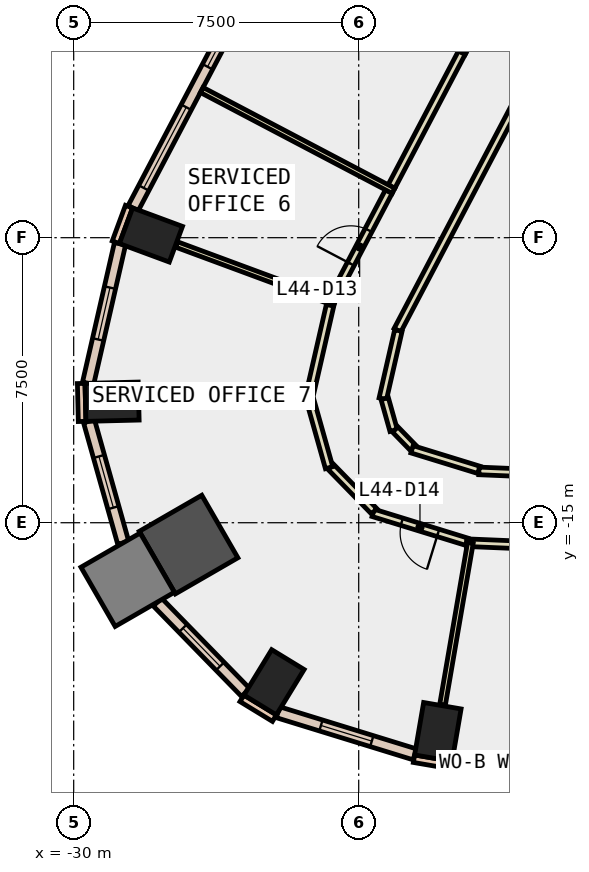
"""IFC4 building model, lengths in metres.
Left out: names, types, materials, properties, quantities, classifications, styles, units other than length and angle.
Written with IfcOpenShell. Run it as: python <this file> out.ifc"""

import sys

from ifc_helpers import new_model, si_unit, direction, frame, frame_2d, origin, origin_2d, place, context, subcontext, project, spatial, rectangle, extrude, element, fill, save


model = new_model("IFC4")
c1 = context("Model", 3, precision=1e-05, world=origin(), true_north=direction((0.0, 1.0)))
c2 = subcontext(c1, "Body", "Model", "MODEL_VIEW")
j1 = project(units=[si_unit("LENGTHUNIT", "METRE"), si_unit("PLANEANGLEUNIT", "RADIAN")], contexts=[c1])
p1 = place(None, origin())
s1 = spatial("IfcSite", under=j1, at=p1, CompositionType="ELEMENT")
p2 = place(p1, origin())
s2 = spatial("IfcBuilding", under=s1, at=p2, CompositionType="ELEMENT")
p3 = place(p2, frame((0.0, 0.0, 198.2)))
s3 = spatial("IfcBuildingStorey", under=s2, at=p3, CompositionType="ELEMENT", Elevation=198.2)
for number, where, z_axis, x_axis in (
    (1, (-20.417, -20.505, -0.4), (0.0, 0.0, 1.0), (-0.986, 0.169, 0.0)),
    (2, (-27.967, -7.429, -0.4), (0.0, 0.0, 1.0), (0.347, 0.938, 0.0)),
    (3, (-28.99, -11.816, -0.4), (0.0, 0.0, 1.0), (-0.025, 1.0, 0.0)),
):
    element("IfcColumn", number, at=place(p3, frame(where, z_axis=z_axis, x_axis=x_axis)), inside=s3, PredefinedType="COLUMN", context=c2, shape_type="SweptSolid", body=[
        extrude(rectangle(XDim=1.0, YDim=1.4, at=origin_2d()), origin(), (0.0, 0.0, 1.0), 4.2),
    ])
p4 = place(p3, frame((-26.977, -15.575, -0.4), z_axis=(0.0, 0.0, 1.0), x_axis=(0.866025403784, 0.5, 0.0)))
e4 = element("IfcColumn", 4, at=p4, inside=s3, PredefinedType="COLUMN", context=c2, shape_type="SweptSolid", body=[
    extrude(rectangle(XDim=1.9, YDim=1.9, at=origin_2d()), origin(), (0.0, 0.0, 1.0), 4.2),
])
p5 = place(p3, frame((-24.728, -19.199, -0.4), z_axis=(0.0, 0.0, 1.0), x_axis=(-0.853423465127, 0.521218178089, 0.0)))
e5 = element("IfcColumn", 5, at=p5, inside=s3, PredefinedType="COLUMN", context=c2, shape_type="SweptSolid", body=[
    extrude(rectangle(XDim=1.0, YDim=1.4, at=origin_2d()), origin(), (0.0, 0.0, 1.0), 4.2),
])
p6 = place(p3, frame((-28.579, -16.5, -0.4), z_axis=(0.0, 0.0, 1.0), x_axis=(0.866025403784, 0.5, 0.0)))
e6 = element("IfcColumn", 6, at=p6, inside=s3, PredefinedType="COLUMN", context=c2, shape_type="SweptSolid", body=[
    extrude(rectangle(XDim=1.8, YDim=1.8, at=origin_2d()), origin(), (0.0, 0.0, 1.0), 4.2),
])
for number, where, z_axis, x_axis in (
    (7, (-28.544, -6.683, 0.0), (0.0, 0.0, 1.0), (-0.347, -0.938, 0.0)),
    (8, (-21.045, -21.209, 0.0), (0.0, 0.0, 1.0), (0.986, -0.169, 0.0)),
):
    element("IfcWall", number, at=place(p3, frame(where, z_axis=z_axis, x_axis=x_axis)), inside=s3, PredefinedType="STANDARD", context=c2, shape_type="SweptSolid", body=[
        extrude(rectangle(XDim=1.0, YDim=0.2, at=frame_2d((0.5, 0.0))), origin(), (0.0, 0.0, 1.0), 3.8),
    ])
p7 = place(p3, frame((-29.802, -11.336, 0.0), z_axis=(0.0, 0.0, 1.0), x_axis=(0.023942303888, -0.999713341956, 0.0)))
e9 = element("IfcWall", 9, at=p7, inside=s3, PredefinedType="STANDARD", context=c2, shape_type="SweptSolid", body=[
    extrude(rectangle(XDim=0.999, YDim=0.2, at=frame_2d((0.5, 0.0))), origin(), (0.0, 0.0, 1.0), 3.8),
])
p8 = place(p3, frame((-25.572, -19.621, 0.0), z_axis=(0.0, 0.0, 1.0), x_axis=(0.853679739553, -0.520798331677, 0.0)))
e10 = element("IfcWall", 10, at=p8, inside=s3, PredefinedType="STANDARD", context=c2, shape_type="SweptSolid", body=[
    extrude(rectangle(XDim=1.0, YDim=0.2, at=frame_2d((0.5, 0.0))), origin(), (0.0, 0.0, 1.0), 3.8),
])
p9 = place(p3, frame((-20.041, -21.264, 0.0), z_axis=(0.0, 0.0, 1.0), x_axis=(0.999127941775, -0.041753514387, 0.0)))
e11 = element("IfcWall", 11, at=p9, inside=s3, PredefinedType="STANDARD", context=c2, shape_type="SweptSolid", body=[
    extrude(rectangle(XDim=5.368, YDim=0.3, at=frame_2d((2.684, 0.0))), origin(), (0.0, 0.0, 1.0), 3.8),
])
p10 = place(p9, frame((0.642, 0.0, 0.9)))
e12 = element("IfcOpeningElement", 12, at=p10, cuts=e11, PredefinedType="OPENING", context=c2, shape_type="SweptSolid", body=[
    extrude(rectangle(XDim=1.4, YDim=2.6, at=frame_2d((0.7, 1.3))), frame((0.0, 0.16, 0.0), z_axis=(0.0, -1.0, 0.0), x_axis=(1.0, 0.0, 0.0)), (0.0, 0.0, 1.0), 0.32),
])
p11 = place(p9, frame((3.326, 0.0, 0.9)))
e13 = element("IfcOpeningElement", 13, at=p11, cuts=e11, PredefinedType="OPENING", context=c2, shape_type="SweptSolid", body=[
    extrude(rectangle(XDim=1.4, YDim=2.6, at=frame_2d((0.7, 1.3))), frame((0.0, 0.16, 0.0), z_axis=(0.0, -1.0, 0.0), x_axis=(1.0, 0.0, 0.0)), (0.0, 0.0, 1.0), 0.32),
])
p12 = place(p3, frame((-25.08, -0.345, 0.0), z_axis=(0.0, 0.0, 1.0), x_axis=(-0.465478369088, -0.885059256723, 0.0)))
e14 = element("IfcWall", 14, at=p12, inside=s3, PredefinedType="STANDARD", context=c2, shape_type="SweptSolid", body=[
    extrude(rectangle(XDim=7.208, YDim=0.3, at=frame_2d((3.604, 0.0))), origin(), (0.0, 0.0, 1.0), 3.8),
])
p13 = place(p12, frame((0.602, 0.0, 0.9)))
e15 = element("IfcOpeningElement", 15, at=p13, cuts=e14, PredefinedType="OPENING", context=c2, shape_type="SweptSolid", body=[
    extrude(rectangle(XDim=2.4, YDim=2.6, at=frame_2d((1.2, 1.3))), frame((0.0, 0.16, 0.0), z_axis=(0.0, -1.0, 0.0), x_axis=(1.0, 0.0, 0.0)), (0.0, 0.0, 1.0), 0.32),
])
p14 = place(p12, frame((4.206, 0.0, 0.9)))
e16 = element("IfcOpeningElement", 16, at=p14, cuts=e14, PredefinedType="OPENING", context=c2, shape_type="SweptSolid", body=[
    extrude(rectangle(XDim=2.4, YDim=2.6, at=frame_2d((1.2, 1.3))), frame((0.0, 0.16, 0.0), z_axis=(0.0, -1.0, 0.0), x_axis=(1.0, 0.0, 0.0)), (0.0, 0.0, 1.0), 0.32),
])
p15 = place(p3, frame((-28.781, -7.66, 0.0), z_axis=(0.0, 0.0, 1.0), x_axis=(-0.223013094864, -0.974815448954, 0.0)))
e17 = element("IfcWall", 17, at=p15, inside=s3, PredefinedType="STANDARD", context=c2, shape_type="SweptSolid", body=[
    extrude(rectangle(XDim=3.767, YDim=0.3, at=frame_2d((1.884, 0.0))), origin(), (0.0, 0.0, 1.0), 3.8),
])
p16 = place(p15, frame((1.183, 0.0, 0.9)))
e18 = element("IfcOpeningElement", 18, at=p16, cuts=e17, PredefinedType="OPENING", context=c2, shape_type="SweptSolid", body=[
    extrude(rectangle(XDim=1.4, YDim=2.6, at=frame_2d((0.7, 1.3))), frame((0.0, 0.16, 0.0), z_axis=(0.0, -1.0, 0.0), x_axis=(1.0, 0.0, 0.0)), (0.0, 0.0, 1.0), 0.32),
])
p17 = place(p3, frame((-29.596, -12.33, 0.0), z_axis=(0.0, 0.0, 1.0), x_axis=(0.270798765166, -0.962635979374, 0.0)))
e19 = element("IfcWall", 19, at=p17, inside=s3, PredefinedType="STANDARD", context=c2, shape_type="SweptSolid", body=[
    extrude(rectangle(XDim=3.323, YDim=0.3, at=frame_2d((1.662, 0.0))), origin(), (0.0, 0.0, 1.0), 3.8),
])
p18 = place(p17, frame((0.962, 0.0, 0.9)))
e20 = element("IfcOpeningElement", 20, at=p18, cuts=e19, PredefinedType="OPENING", context=c2, shape_type="SweptSolid", body=[
    extrude(rectangle(XDim=1.4, YDim=2.6, at=frame_2d((0.7, 1.3))), frame((0.0, 0.16, 0.0), z_axis=(0.0, -1.0, 0.0), x_axis=(1.0, 0.0, 0.0)), (0.0, 0.0, 1.0), 0.32),
])
p19 = place(p3, frame((-27.797, -17.087, 0.0), z_axis=(0.0, 0.0, 1.0), x_axis=(0.698311919602, -0.71579358962, 0.0)))
e21 = element("IfcWall", 21, at=p19, inside=s3, PredefinedType="STANDARD", context=c2, shape_type="SweptSolid", body=[
    extrude(rectangle(XDim=3.324, YDim=0.3, at=frame_2d((1.662, 0.0))), origin(), (0.0, 0.0, 1.0), 3.8),
])
p20 = place(p19, frame((0.962, 0.0, 0.9)))
e22 = element("IfcOpeningElement", 22, at=p20, cuts=e21, PredefinedType="OPENING", context=c2, shape_type="SweptSolid", body=[
    extrude(rectangle(XDim=1.4, YDim=2.6, at=frame_2d((0.7, 1.3))), frame((0.0, 0.16, 0.0), z_axis=(0.0, -1.0, 0.0), x_axis=(1.0, 0.0, 0.0)), (0.0, 0.0, 1.0), 0.32),
])
p21 = place(p3, frame((-24.624, -19.986, 0.0), z_axis=(0.0, 0.0, 1.0), x_axis=(0.955692086233, -0.29436819854, 0.0)))
e23 = element("IfcWall", 23, at=p21, inside=s3, PredefinedType="STANDARD", context=c2, shape_type="SweptSolid", body=[
    extrude(rectangle(XDim=3.767, YDim=0.3, at=frame_2d((1.884, 0.0))), origin(), (0.0, 0.0, 1.0), 3.8),
])
p22 = place(p21, frame((1.183, 0.0, 0.9)))
e24 = element("IfcOpeningElement", 24, at=p22, cuts=e23, PredefinedType="OPENING", context=c2, shape_type="SweptSolid", body=[
    extrude(rectangle(XDim=1.4, YDim=2.6, at=frame_2d((0.7, 1.3))), frame((0.0, 0.16, 0.0), z_axis=(0.0, -1.0, 0.0), x_axis=(1.0, 0.0, 0.0)), (0.0, 0.0, 1.0), 0.32),
])
p23 = place(p3, frame((-18.112, -3.531, 0.0), z_axis=(0.0, 0.0, 1.0), x_axis=(-0.465461327558, -0.885068219149, 0.0)))
e25 = element("IfcWall", 25, at=p23, inside=s3, PredefinedType="PARTITIONING", context=c2, shape_type="SweptSolid", body=[
    extrude(rectangle(XDim=7.236, YDim=0.2, at=frame_2d((3.618, 0.0))), origin(), (0.0, 0.0, 1.0), 3.8),
])
p24 = place(p3, frame((-21.456, -9.944, 0.0), z_axis=(0.0, 0.0, 1.0), x_axis=(-0.222871656966, -0.974847795567, 0.0)))
e26 = element("IfcWall", 26, at=p24, inside=s3, PredefinedType="PARTITIONING", context=c2, shape_type="SweptSolid", body=[
    extrude(rectangle(XDim=1.839, YDim=0.2, at=frame_2d((0.919, 0.0))), origin(), (0.0, 0.0, 1.0), 3.8),
])
p25 = place(p3, frame((-21.816, -11.735, 0.0), z_axis=(0.0, 0.0, 1.0), x_axis=(0.270192443589, -0.962806337447, 0.0)))
e27 = element("IfcWall", 27, at=p25, inside=s3, PredefinedType="PARTITIONING", context=c2, shape_type="SweptSolid", body=[
    extrude(rectangle(XDim=0.869, YDim=0.2, at=frame_2d((0.435, 0.0))), origin(), (0.0, 0.0, 1.0), 3.8),
])
p26 = place(p3, frame((-21.538, -12.547, 0.0), z_axis=(0.0, 0.0, 1.0), x_axis=(0.697542638825, -0.716543276446, 0.0)))
e28 = element("IfcWall", 28, at=p26, inside=s3, PredefinedType="PARTITIONING", context=c2, shape_type="SweptSolid", body=[
    extrude(rectangle(XDim=0.668, YDim=0.2, at=frame_2d((0.334, 0.0))), origin(), (0.0, 0.0, 1.0), 3.8),
])
p27 = place(p3, frame((-21.097, -13.068, 0.0), z_axis=(0.0, 0.0, 1.0), x_axis=(0.955790442908, -0.294048685161, 0.0)))
e29 = element("IfcWall", 29, at=p27, inside=s3, PredefinedType="PARTITIONING", context=c2, shape_type="SweptSolid", body=[
    extrude(rectangle(XDim=1.846, YDim=0.2, at=frame_2d((0.923, 0.0))), origin(), (0.0, 0.0, 1.0), 3.8),
])
p28 = place(p3, frame((-19.336, -13.637, 0.0), z_axis=(0.0, 0.0, 1.0), x_axis=(0.999130261307, -0.041697972867, 0.0)))
e30 = element("IfcWall", 30, at=p28, inside=s3, PredefinedType="PARTITIONING", context=c2, shape_type="SweptSolid", body=[
    extrude(rectangle(XDim=5.422, YDim=0.2, at=frame_2d((2.711, 0.0))), origin(), (0.0, 0.0, 1.0), 3.8),
])
p29 = place(p3, frame((-21.638, -6.154, 0.0), z_axis=(0.0, 0.0, 1.0), x_axis=(0.465392595139, 0.885104362428, 0.0)))
e31 = element("IfcWall", 31, at=p29, inside=s3, PredefinedType="PARTITIONING", context=c2, shape_type="SweptSolid", body=[
    extrude(rectangle(XDim=3.982, YDim=0.2, at=frame_2d((1.991, 0.0))), origin(), (0.0, 0.0, 1.0), 3.8),
])
p30 = place(p3, frame((-19.785, -2.63, 0.0), z_axis=(0.0, 0.0, 1.0), x_axis=(0.482817232578, 0.875721142788, 0.0)))
e32 = element("IfcWall", 32, at=p30, inside=s3, PredefinedType="PARTITIONING", context=c2, shape_type="SweptSolid", body=[
    extrude(rectangle(XDim=8.04, YDim=0.2, at=frame_2d((4.02, 0.0))), origin(), (0.0, 0.0, 1.0), 3.8),
])
p31 = place(p30, frame((3.595, 0.0, 0.0)))
e33 = element("IfcOpeningElement", 33, at=p31, cuts=e32, PredefinedType="OPENING", context=c2, shape_type="SweptSolid", body=[
    extrude(rectangle(XDim=1.0, YDim=2.1, at=frame_2d((0.5, 1.05))), frame((0.0, 0.11, 0.0), z_axis=(0.0, -1.0, 0.0), x_axis=(1.0, 0.0, 0.0)), (0.0, 0.0, 1.0), 0.22),
])
p32 = place(p3, frame((-23.242, -9.204, 0.0), z_axis=(0.0, 0.0, 1.0), x_axis=(0.465431933571, 0.885083676955, 0.0)))
e34 = element("IfcWall", 34, at=p32, inside=s3, PredefinedType="PARTITIONING", context=c2, shape_type="SweptSolid", body=[
    extrude(rectangle(XDim=3.296, YDim=0.2, at=frame_2d((1.648, 0.0))), origin(), (0.0, 0.0, 1.0), 3.8),
])
p33 = place(p32, frame((1.148, 0.0, 0.0)))
e35 = element("IfcOpeningElement", 35, at=p33, cuts=e34, PredefinedType="OPENING", context=c2, shape_type="SweptSolid", body=[
    extrude(rectangle(XDim=1.0, YDim=2.1, at=frame_2d((0.5, 1.05))), frame((0.0, 0.11, 0.0), z_axis=(0.0, -1.0, 0.0), x_axis=(1.0, 0.0, 0.0)), (0.0, 0.0, 1.0), 0.22),
])
p34 = place(p3, frame((-19.657, -15.5, 0.0), z_axis=(0.0, 0.0, 1.0), x_axis=(-0.955612889251, 0.294625195625, 0.0)))
e36 = element("IfcWall", 36, at=p34, inside=s3, PredefinedType="PARTITIONING", context=c2, shape_type="SweptSolid", body=[
    extrude(rectangle(XDim=2.576, YDim=0.2, at=frame_2d((1.288, 0.0))), origin(), (0.0, 0.0, 1.0), 3.8),
])
p35 = place(p34, frame((0.788, 0.0, 0.0)))
e37 = element("IfcOpeningElement", 37, at=p35, cuts=e36, PredefinedType="OPENING", context=c2, shape_type="SweptSolid", body=[
    extrude(rectangle(XDim=1.0, YDim=2.1, at=frame_2d((0.5, 1.05))), frame((0.0, 0.11, 0.0), z_axis=(0.0, -1.0, 0.0), x_axis=(1.0, 0.0, 0.0)), (0.0, 0.0, 1.0), 0.22),
])
p36 = place(p3, frame((-22.093, -14.699, 0.0), z_axis=(0.0, 0.0, 1.0), x_axis=(-0.698551276451, 0.715560000397, 0.0)))
e38 = element("IfcWall", 38, at=p36, inside=s3, PredefinedType="PARTITIONING", context=c2, shape_type="SweptSolid", body=[
    extrude(rectangle(XDim=1.636, YDim=0.2, at=frame_2d((0.818, 0.0))), origin(), (0.0, 0.0, 1.0), 3.8),
])
p37 = place(p3, frame((-23.279, -13.552, 0.0), z_axis=(0.0, 0.0, 1.0), x_axis=(-0.270522287318, 0.962713712411, 0.0)))
e39 = element("IfcWall", 39, at=p37, inside=s3, PredefinedType="PARTITIONING", context=c2, shape_type="SweptSolid", body=[
    extrude(rectangle(XDim=1.836, YDim=0.2, at=frame_2d((0.918, 0.0))), origin(), (0.0, 0.0, 1.0), 3.8),
])
p38 = place(p3, frame((-23.826, -11.785, 0.0), z_axis=(0.0, 0.0, 1.0), x_axis=(0.222909903746, 0.974839050722, 0.0)))
e40 = element("IfcWall", 40, at=p38, inside=s3, PredefinedType="PARTITIONING", context=c2, shape_type="SweptSolid", body=[
    extrude(rectangle(XDim=2.571, YDim=0.2, at=frame_2d((1.285, 0.0))), origin(), (0.0, 0.0, 1.0), 3.8),
])
p39 = place(p3, frame((-13.984, -15.762, 0.0), z_axis=(0.0, 0.0, 1.0), x_axis=(-0.999129271091, 0.041721692781, 0.0)))
e41 = element("IfcWall", 41, at=p39, inside=s3, PredefinedType="PARTITIONING", context=c2, shape_type="SweptSolid", body=[
    extrude(rectangle(XDim=5.682, YDim=0.2, at=frame_2d((2.841, 0.0))), origin(), (0.0, 0.0, 1.0), 3.8),
])
p40 = place(p39, frame((2.341, 0.0, 0.0)))
e42 = element("IfcOpeningElement", 42, at=p40, cuts=e41, PredefinedType="OPENING", context=c2, shape_type="SweptSolid", body=[
    extrude(rectangle(XDim=1.0, YDim=2.1, at=frame_2d((0.5, 1.05))), frame((0.0, 0.11, 0.0), z_axis=(0.0, -1.0, 0.0), x_axis=(1.0, 0.0, 0.0)), (0.0, 0.0, 1.0), 0.22),
])
p41 = place(p3, frame((-21.585, -6.267, 0.0), z_axis=(0.0, 0.0, 1.0), x_axis=(-0.885073333504, 0.465451602554, 0.0)))
e43 = element("IfcWall", 43, at=p41, inside=s3, PredefinedType="PARTITIONING", context=c2, shape_type="SweptSolid", body=[
    extrude(rectangle(XDim=5.7, YDim=0.15, at=frame_2d((2.85, 0.0))), origin(), (0.0, 0.0, 1.0), 3.8),
])
p42 = place(p3, frame((-23.137, -9.217, 0.0), z_axis=(0.0, 0.0, 1.0), x_axis=(-0.937808569806, 0.34715282859, 0.0)))
e44 = element("IfcWall", 44, at=p42, inside=s3, PredefinedType="PARTITIONING", context=c2, shape_type="SweptSolid", body=[
    extrude(rectangle(XDim=4.431, YDim=0.15, at=frame_2d((2.215, 0.0))), origin(), (0.0, 0.0, 1.0), 3.8),
])
p43 = place(p3, frame((-19.561, -15.529, 0.0), z_axis=(0.0, 0.0, 1.0), x_axis=(-0.169546150064, -0.98552224886, 0.0)))
e45 = element("IfcWall", 45, at=p43, inside=s3, PredefinedType="PARTITIONING", context=c2, shape_type="SweptSolid", body=[
    extrude(rectangle(XDim=4.329, YDim=0.15, at=frame_2d((2.164, 0.0))), origin(), (0.0, 0.0, 1.0), 3.8),
])
p44 = place(p10, origin())
e46 = element("IfcWindow", 46, at=p44, inside=s3, PartitioningType="SINGLE_PANEL", PredefinedType="WINDOW", context=c2, shape_type="SweptSolid", body=[
    extrude(rectangle(XDim=1.4, YDim=2.6, at=frame_2d((0.7, 1.3))), frame((0.0, 0.03, 0.0), z_axis=(0.0, -1.0, 0.0), x_axis=(1.0, 0.0, 0.0)), (0.0, 0.0, 1.0), 0.06),
])
fill(e12, e46)
p45 = place(p13, origin())
e47 = element("IfcWindow", 47, at=p45, inside=s3, PartitioningType="SINGLE_PANEL", PredefinedType="WINDOW", context=c2, shape_type="SweptSolid", body=[
    extrude(rectangle(XDim=2.4, YDim=2.6, at=frame_2d((1.2, 1.3))), frame((0.0, 0.03, 0.0), z_axis=(0.0, -1.0, 0.0), x_axis=(1.0, 0.0, 0.0)), (0.0, 0.0, 1.0), 0.06),
])
fill(e15, e47)
p46 = place(p14, origin())
e48 = element("IfcWindow", 48, at=p46, inside=s3, PartitioningType="SINGLE_PANEL", PredefinedType="WINDOW", context=c2, shape_type="SweptSolid", body=[
    extrude(rectangle(XDim=2.4, YDim=2.6, at=frame_2d((1.2, 1.3))), frame((0.0, 0.03, 0.0), z_axis=(0.0, -1.0, 0.0), x_axis=(1.0, 0.0, 0.0)), (0.0, 0.0, 1.0), 0.06),
])
fill(e16, e48)
p47 = place(p16, origin())
e49 = element("IfcWindow", 49, at=p47, inside=s3, PartitioningType="SINGLE_PANEL", PredefinedType="WINDOW", context=c2, shape_type="SweptSolid", body=[
    extrude(rectangle(XDim=1.4, YDim=2.6, at=frame_2d((0.7, 1.3))), frame((0.0, 0.03, 0.0), z_axis=(0.0, -1.0, 0.0), x_axis=(1.0, 0.0, 0.0)), (0.0, 0.0, 1.0), 0.06),
])
fill(e18, e49)
p48 = place(p18, origin())
e50 = element("IfcWindow", 50, at=p48, inside=s3, PartitioningType="SINGLE_PANEL", PredefinedType="WINDOW", context=c2, shape_type="SweptSolid", body=[
    extrude(rectangle(XDim=1.4, YDim=2.6, at=frame_2d((0.7, 1.3))), frame((0.0, 0.03, 0.0), z_axis=(0.0, -1.0, 0.0), x_axis=(1.0, 0.0, 0.0)), (0.0, 0.0, 1.0), 0.06),
])
fill(e20, e50)
p49 = place(p20, origin())
e51 = element("IfcWindow", 51, at=p49, inside=s3, PartitioningType="SINGLE_PANEL", PredefinedType="WINDOW", context=c2, shape_type="SweptSolid", body=[
    extrude(rectangle(XDim=1.4, YDim=2.6, at=frame_2d((0.7, 1.3))), frame((0.0, 0.03, 0.0), z_axis=(0.0, -1.0, 0.0), x_axis=(1.0, 0.0, 0.0)), (0.0, 0.0, 1.0), 0.06),
])
fill(e22, e51)
p50 = place(p22, origin())
e52 = element("IfcWindow", 52, at=p50, inside=s3, PartitioningType="SINGLE_PANEL", PredefinedType="WINDOW", context=c2, shape_type="SweptSolid", body=[
    extrude(rectangle(XDim=1.4, YDim=2.6, at=frame_2d((0.7, 1.3))), frame((0.0, 0.03, 0.0), z_axis=(0.0, -1.0, 0.0), x_axis=(1.0, 0.0, 0.0)), (0.0, 0.0, 1.0), 0.06),
])
fill(e24, e52)
p51 = place(p33, origin())
e53 = element("IfcDoor", 53, at=p51, inside=s3, OperationType="SINGLE_SWING_RIGHT", PredefinedType="DOOR", context=c2, shape_type="SweptSolid", body=[
    extrude(rectangle(XDim=1.0, YDim=2.1, at=frame_2d((0.5, 1.05))), frame((0.0, 0.025, 0.0), z_axis=(0.0, -1.0, 0.0), x_axis=(1.0, 0.0, 0.0)), (0.0, 0.0, 1.0), 0.05),
])
fill(e35, e53)
p52 = place(p35, origin())
e54 = element("IfcDoor", 54, at=p52, inside=s3, OperationType="SINGLE_SWING_LEFT", PredefinedType="DOOR", context=c2, shape_type="SweptSolid", body=[
    extrude(rectangle(XDim=1.0, YDim=2.1, at=frame_2d((0.5, 1.05))), frame((0.0, 0.025, 0.0), z_axis=(0.0, -1.0, 0.0), x_axis=(1.0, 0.0, 0.0)), (0.0, 0.0, 1.0), 0.05),
])
fill(e37, e54)
save(model, sys.argv[1])
